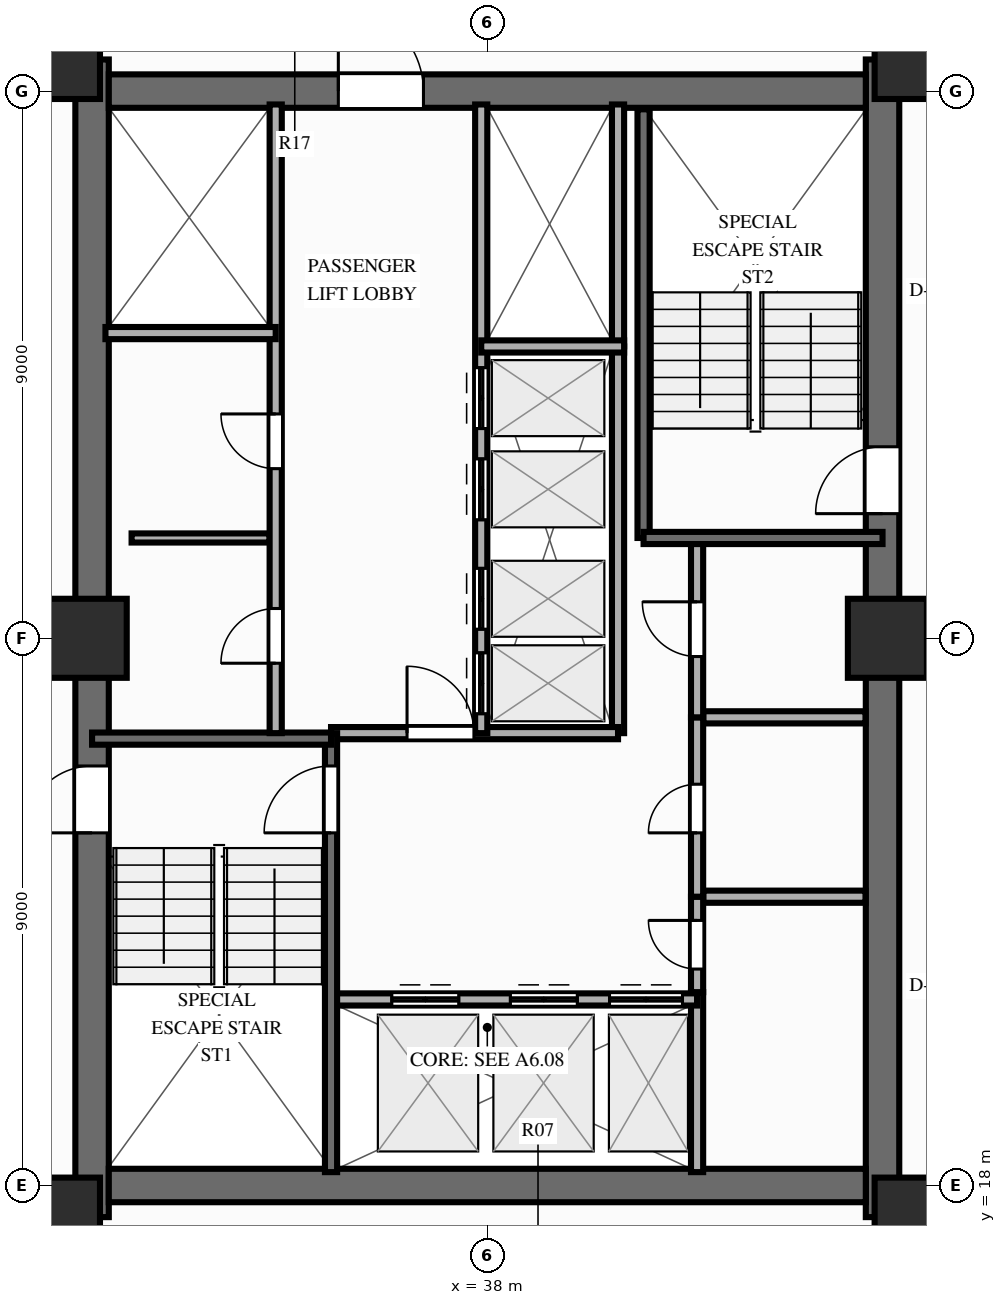
"""IFC4 building model, lengths in metres.
Left out: names, types, materials, properties, quantities, classifications, styles, units other than length and angle.
Written with IfcOpenShell. Run it as: python <this file> out.ifc"""

import sys

from ifc_helpers import new_model, si_unit, direction, frame, frame_2d, origin, origin_2d, place, context, subcontext, project, spatial, rectangle, extrude, source, transform, mapped, element, fill, save


model = new_model("IFC4")
c1 = context("Model", 3, precision=1e-05, world=origin(), true_north=direction((0.0, 1.0)))
c2 = subcontext(c1, "Body", "Model", "MODEL_VIEW")
j1 = project(units=[si_unit("LENGTHUNIT", "METRE"), si_unit("PLANEANGLEUNIT", "RADIAN")], contexts=[c1])
p1 = place(None, origin())
s1 = spatial("IfcSite", under=j1, at=p1, CompositionType="ELEMENT")
p2 = place(p1, origin())
s2 = spatial("IfcBuilding", under=s1, at=p2, CompositionType="ELEMENT")
p3 = place(p2, frame((0.0, 0.0, 98.85)))
s3 = spatial("IfcBuildingStorey", under=s2, at=p3, CompositionType="ELEMENT", Elevation=98.85)
p4 = place(p3, frame((31.5, 17.48, 0.0), z_axis=(0.0, 0.0, 1.0), x_axis=(0.0, 1.0, 0.0)))
e1 = element("IfcWall", 1, at=p4, inside=s3, PredefinedType="SHEAR", context=c2, shape_type="SweptSolid", body=[
    extrude(rectangle(XDim=19.04, YDim=0.55, at=frame_2d((9.52, 0.0))), origin(), (0.0, 0.0, 1.0), 3.0),
])
p5 = place(p4, frame((6.32, 0.0, 0.0)))
e2 = element("IfcOpeningElement", 2, at=p5, cuts=e1, PredefinedType="OPENING", context=c2, shape_type="SweptSolid", body=[
    extrude(rectangle(XDim=1.1, YDim=2.15, at=frame_2d((0.55, 1.075))), frame((0.0, 0.287, 0.0), z_axis=(0.0, -1.0, 0.0), x_axis=(1.0, 0.0, 0.0)), (0.0, 0.0, 1.0), 0.574),
])
p6 = place(p3, frame((44.5, 17.48, 0.0), z_axis=(0.0, 0.0, 1.0), x_axis=(0.0, 1.0, 0.0)))
e3 = element("IfcWall", 3, at=p6, inside=s3, PredefinedType="SHEAR", context=c2, shape_type="SweptSolid", body=[
    extrude(rectangle(XDim=19.04, YDim=0.55, at=frame_2d((9.52, 0.0))), origin(), (0.0, 0.0, 1.0), 3.0),
])
p7 = place(p6, frame((12.67, 0.0, 0.0), z_axis=(0.0, 0.0, 1.0), x_axis=(-1.0, 0.0, 0.0)))
e4 = element("IfcOpeningElement", 4, at=p7, cuts=e3, PredefinedType="OPENING", context=c2, shape_type="SweptSolid", body=[
    extrude(rectangle(XDim=1.1, YDim=2.15, at=frame_2d((0.55, 1.075))), frame((0.0, 0.287, 0.0), z_axis=(0.0, -1.0, 0.0), x_axis=(1.0, 0.0, 0.0)), (0.0, 0.0, 1.0), 0.574),
])
p8 = place(p3, frame((31.775, 18.0, 0.0), z_axis=(0.0, 0.0, 1.0), x_axis=(1.0, 0.0, 0.0)))
e5 = element("IfcWall", 5, at=p8, inside=s3, PredefinedType="SHEAR", context=c2, shape_type="SweptSolid", body=[
    extrude(rectangle(XDim=12.45, YDim=0.55, at=frame_2d((6.225, 0.0))), origin(), (0.0, 0.0, 1.0), 3.0),
])
p9 = place(p3, frame((31.775, 36.0, 0.0), z_axis=(0.0, 0.0, 1.0), x_axis=(1.0, 0.0, 0.0)))
e6 = element("IfcWall", 6, at=p9, inside=s3, PredefinedType="SHEAR", context=c2, shape_type="SweptSolid", body=[
    extrude(rectangle(XDim=12.45, YDim=0.55, at=frame_2d((6.225, 0.0))), origin(), (0.0, 0.0, 1.0), 3.0),
])
p10 = place(p9, frame((5.175, 0.0, 0.0), z_axis=(0.0, 0.0, 1.0), x_axis=(-1.0, 0.0, 0.0)))
e7 = element("IfcOpeningElement", 7, at=p10, cuts=e6, PredefinedType="OPENING", context=c2, shape_type="SweptSolid", body=[
    extrude(rectangle(XDim=1.4, YDim=2.15, at=frame_2d((0.7, 1.075))), frame((0.0, 0.287, 0.0), z_axis=(0.0, -1.0, 0.0), x_axis=(1.0, 0.0, 0.0)), (0.0, 0.0, 1.0), 0.574),
])
m1 = source(origin(), c2, "Body", "SweptSolid", [
    extrude(rectangle(XDim=1.3, YDim=1.3, at=origin_2d()), origin(), (0.0, 0.0, 1.0), 3.0),
])
for number, where, z_axis, x_axis in (
    (8, (30.98, 17.48, 0.0), (0.0, 0.0, 1.0), (1.0, 0.0, 0.0)),
    (9, (45.02, 17.48, 0.0), (0.0, 0.0, 1.0), (1.0, 0.0, 0.0)),
    (10, (30.98, 36.52, 0.0), (0.0, 0.0, 1.0), (1.0, 0.0, 0.0)),
    (11, (45.02, 36.52, 0.0), (0.0, 0.0, 1.0), (1.0, 0.0, 0.0)),
    (12, (31.42, 27.0, 0.0), (0.0, 0.0, 1.0), (1.0, 0.0, 0.0)),
    (13, (44.58, 27.0, 0.0), (0.0, 0.0, 1.0), (1.0, 0.0, 0.0)),
):
    element("IfcColumn", number, at=place(p3, frame(where, z_axis=z_axis, x_axis=x_axis)), inside=s3, PredefinedType="COLUMN", context=c2, shape_type="MappedRepresentation", body=[
        mapped(m1, transform((0.0, 0.0, 0.0), scale=1.0)),
    ])
p11 = place(p3, frame((32.15, 28.65, 0.0), z_axis=(0.0, 0.0, 1.0), x_axis=(1.0, 0.0, 0.0)))
e14 = element("IfcWall", 14, at=p11, inside=s3, PredefinedType="PARTITIONING", context=c2, shape_type="SweptSolid", body=[
    extrude(rectangle(XDim=2.27, YDim=0.15, at=frame_2d((1.135, 0.0))), origin(), (0.0, 0.0, 1.0), 2.14),
])
p12 = place(p3, frame((41.55, 22.75, 0.0), z_axis=(0.0, 0.0, 1.0), x_axis=(1.0, 0.0, 0.0)))
e15 = element("IfcWall", 15, at=p12, inside=s3, PredefinedType="PARTITIONING", context=c2, shape_type="SweptSolid", body=[
    extrude(rectangle(XDim=2.67, YDim=0.2, at=frame_2d((1.335, 0.0))), origin(), (0.0, 0.0, 1.0), 2.79),
])
p13 = place(p3, frame((41.55, 25.7, 0.0), z_axis=(0.0, 0.0, 1.0), x_axis=(1.0, 0.0, 0.0)))
e16 = element("IfcWall", 16, at=p13, inside=s3, PredefinedType="PARTITIONING", context=c2, shape_type="SweptSolid", body=[
    extrude(rectangle(XDim=2.67, YDim=0.2, at=frame_2d((1.335, 0.0))), origin(), (0.0, 0.0, 1.0), 2.14),
])
p14 = place(p3, frame((41.45, 18.22, 0.0), z_axis=(0.0, 0.0, 1.0), x_axis=(0.0, 1.0, 0.0)))
e17 = element("IfcWall", 17, at=p14, inside=s3, PredefinedType="PARTITIONING", context=c2, shape_type="SweptSolid", body=[
    extrude(rectangle(XDim=2.96, YDim=0.2, at=frame_2d((1.48, 0.0))), origin(), (0.0, 0.0, 1.0), 2.79),
])
p15 = place(p3, frame((41.45, 21.18, 0.0), z_axis=(0.0, 0.0, 1.0), x_axis=(0.0, 1.0, 0.0)))
e18 = element("IfcWall", 18, at=p15, inside=s3, PredefinedType="PARTITIONING", context=c2, shape_type="SweptSolid", body=[
    extrude(rectangle(XDim=1.57, YDim=0.2, at=frame_2d((0.785, 0.0))), origin(), (0.0, 0.0, 1.0), 2.79),
])
p16 = place(p15, frame((0.38, 0.0, 0.0)))
e19 = element("IfcOpeningElement", 19, at=p16, cuts=e18, PredefinedType="OPENING", context=c2, shape_type="SweptSolid", body=[
    extrude(rectangle(XDim=0.8, YDim=2.05, at=frame_2d((0.4, 1.025))), frame((0.0, 0.112, 0.0), z_axis=(0.0, -1.0, 0.0), x_axis=(1.0, 0.0, 0.0)), (0.0, 0.0, 1.0), 0.224),
])
p17 = place(p3, frame((41.45, 22.75, 0.0), z_axis=(0.0, 0.0, 1.0), x_axis=(0.0, 1.0, 0.0)))
e20 = element("IfcWall", 20, at=p17, inside=s3, PredefinedType="PARTITIONING", context=c2, shape_type="SweptSolid", body=[
    extrude(rectangle(XDim=2.95, YDim=0.2, at=frame_2d((1.475, 0.0))), origin(), (0.0, 0.0, 1.0), 2.79),
])
p18 = place(p17, frame((1.05, 0.0, 0.0)))
e21 = element("IfcOpeningElement", 21, at=p18, cuts=e20, PredefinedType="OPENING", context=c2, shape_type="SweptSolid", body=[
    extrude(rectangle(XDim=0.8, YDim=2.05, at=frame_2d((0.4, 1.025))), frame((0.0, 0.112, 0.0), z_axis=(0.0, -1.0, 0.0), x_axis=(1.0, 0.0, 0.0)), (0.0, 0.0, 1.0), 0.224),
])
p19 = place(p3, frame((41.45, 25.7, 0.0), z_axis=(0.0, 0.0, 1.0), x_axis=(0.0, 1.0, 0.0)))
e22 = element("IfcWall", 22, at=p19, inside=s3, PredefinedType="PARTITIONING", context=c2, shape_type="SweptSolid", body=[
    extrude(rectangle(XDim=2.9, YDim=0.2, at=frame_2d((1.45, 0.0))), origin(), (0.0, 0.0, 1.0), 2.79),
])
p20 = place(p19, frame((1.0, 0.0, 0.0)))
e23 = element("IfcOpeningElement", 23, at=p20, cuts=e22, PredefinedType="OPENING", context=c2, shape_type="SweptSolid", body=[
    extrude(rectangle(XDim=0.9, YDim=2.1, at=frame_2d((0.45, 1.05))), frame((0.0, 0.112, 0.0), z_axis=(0.0, -1.0, 0.0), x_axis=(1.0, 0.0, 0.0)), (0.0, 0.0, 1.0), 0.224),
])
p21 = place(p3, frame((40.15, 25.44, 0.0), z_axis=(0.0, 0.0, 1.0), x_axis=(0.0, 1.0, 0.0)))
e24 = element("IfcWall", 24, at=p21, inside=s3, PredefinedType="PARTITIONING", context=c2, shape_type="SweptSolid", body=[
    extrude(rectangle(XDim=6.36, YDim=0.2, at=frame_2d((3.18, 0.0))), origin(), (0.0, 0.0, 1.0), 2.79),
])
p22 = place(p3, frame((40.15, 31.8, 0.0), z_axis=(0.0, 0.0, 1.0), x_axis=(0.0, 1.0, 0.0)))
e25 = element("IfcWall", 25, at=p22, inside=s3, PredefinedType="PARTITIONING", context=c2, shape_type="SweptSolid", body=[
    extrude(rectangle(XDim=3.98, YDim=0.2, at=frame_2d((1.99, 0.0))), origin(), (0.0, 0.0, 1.0), 2.79),
])
p23 = place(p3, frame((35.43, 21.06, 0.0), z_axis=(0.0, 0.0, 1.0), x_axis=(1.0, 0.0, 0.0)))
e26 = element("IfcWall", 26, at=p23, inside=s3, PredefinedType="PARTITIONING", context=c2, shape_type="SweptSolid", body=[
    extrude(rectangle(XDim=6.02, YDim=0.2, at=frame_2d((3.01, 0.0))), origin(), (0.0, 0.0, 1.0), 2.79),
])
p24 = place(p23, frame((1.0, 0.0, 0.0)))
e27 = element("IfcOpeningElement", 27, at=p24, cuts=e26, PredefinedType="OPENING", context=c2, shape_type="SweptSolid", body=[
    extrude(rectangle(XDim=1.1, YDim=2.15, at=frame_2d((0.55, 1.075))), frame((0.0, 0.112, 0.0), z_axis=(0.0, -1.0, 0.0), x_axis=(1.0, 0.0, 0.0)), (0.0, 0.0, 1.0), 0.224),
])
p25 = place(p23, frame((2.95, 0.0, 0.0)))
e28 = element("IfcOpeningElement", 28, at=p25, cuts=e26, PredefinedType="OPENING", context=c2, shape_type="SweptSolid", body=[
    extrude(rectangle(XDim=1.1, YDim=2.15, at=frame_2d((0.55, 1.075))), frame((0.0, 0.112, 0.0), z_axis=(0.0, -1.0, 0.0), x_axis=(1.0, 0.0, 0.0)), (0.0, 0.0, 1.0), 0.224),
])
p26 = place(p23, frame((4.58, 0.0, 0.0)))
e29 = element("IfcOpeningElement", 29, at=p26, cuts=e26, PredefinedType="OPENING", context=c2, shape_type="SweptSolid", body=[
    extrude(rectangle(XDim=1.2, YDim=2.15, at=frame_2d((0.6, 1.075))), frame((0.0, 0.112, 0.0), z_axis=(0.0, -1.0, 0.0), x_axis=(1.0, 0.0, 0.0)), (0.0, 0.0, 1.0), 0.224),
])
p27 = place(p3, frame((35.43, 25.44, 0.0), z_axis=(0.0, 0.0, 1.0), x_axis=(1.0, 0.0, 0.0)))
e30 = element("IfcWall", 30, at=p27, inside=s3, PredefinedType="PARTITIONING", context=c2, shape_type="SweptSolid", body=[
    extrude(rectangle(XDim=4.72, YDim=0.2, at=frame_2d((2.36, 0.0))), origin(), (0.0, 0.0, 1.0), 2.79),
])
p28 = place(p27, frame((1.25, 0.0, 0.0)))
e31 = element("IfcOpeningElement", 31, at=p28, cuts=e30, PredefinedType="OPENING", context=c2, shape_type="SweptSolid", body=[
    extrude(rectangle(XDim=1.1, YDim=2.15, at=frame_2d((0.55, 1.075))), frame((0.0, 0.112, 0.0), z_axis=(0.0, -1.0, 0.0), x_axis=(1.0, 0.0, 0.0)), (0.0, 0.0, 1.0), 0.224),
])
p29 = place(p3, frame((35.43, 18.22, 0.0), z_axis=(0.0, 0.0, 1.0), x_axis=(0.0, 1.0, 0.0)))
e32 = element("IfcWall", 32, at=p29, inside=s3, PredefinedType="SOLIDWALL", context=c2, shape_type="SweptSolid", body=[
    extrude(rectangle(XDim=7.22, YDim=0.2, at=frame_2d((3.61, 0.0))), origin(), (0.0, 0.0, 1.0), 2.79),
])
p30 = place(p29, frame((6.68, 0.0, 0.0), z_axis=(0.0, 0.0, 1.0), x_axis=(-1.0, 0.0, 0.0)))
e33 = element("IfcOpeningElement", 33, at=p30, cuts=e32, PredefinedType="OPENING", context=c2, shape_type="SweptSolid", body=[
    extrude(rectangle(XDim=1.1, YDim=2.15, at=frame_2d((0.55, 1.075))), frame((0.0, 0.112, 0.0), z_axis=(0.0, -1.0, 0.0), x_axis=(1.0, 0.0, 0.0)), (0.0, 0.0, 1.0), 0.224),
])
p31 = place(p3, frame((31.5, 25.35, 0.0), z_axis=(0.0, 0.0, 1.0), x_axis=(1.0, 0.0, 0.0)))
e34 = element("IfcWall", 34, at=p31, inside=s3, PredefinedType="SOLIDWALL", context=c2, shape_type="SweptSolid", body=[
    extrude(rectangle(XDim=3.93, YDim=0.2, at=frame_2d((1.965, 0.0))), origin(), (0.0, 0.0, 1.0), 2.79),
])
p32 = place(p3, frame((40.57, 28.65, 0.0), z_axis=(0.0, 0.0, 1.0), x_axis=(0.0, 1.0, 0.0)))
e35 = element("IfcWall", 35, at=p32, inside=s3, PredefinedType="SOLIDWALL", context=c2, shape_type="SweptSolid", body=[
    extrude(rectangle(XDim=7.05, YDim=0.2, at=frame_2d((3.525, 0.0))), origin(), (0.0, 0.0, 1.0), 2.79),
])
p33 = place(p3, frame((40.57, 28.65, 0.0), z_axis=(0.0, 0.0, 1.0), x_axis=(1.0, 0.0, 0.0)))
e36 = element("IfcWall", 36, at=p33, inside=s3, PredefinedType="SOLIDWALL", context=c2, shape_type="SweptSolid", body=[
    extrude(rectangle(XDim=3.93, YDim=0.2, at=frame_2d((1.965, 0.0))), origin(), (0.0, 0.0, 1.0), 2.79),
])
p34 = place(p3, frame((34.52, 25.44, 0.0), z_axis=(0.0, 0.0, 1.0), x_axis=(0.0, 1.0, 0.0)))
e37 = element("IfcWall", 37, at=p34, inside=s3, PredefinedType="PARTITIONING", context=c2, shape_type="SweptSolid", body=[
    extrude(rectangle(XDim=10.34, YDim=0.2, at=frame_2d((5.17, 0.0))), origin(), (0.0, 0.0, 1.0), 2.79),
])
p35 = place(p34, frame((1.15, 0.0, 0.0)))
e38 = element("IfcOpeningElement", 38, at=p35, cuts=e37, PredefinedType="OPENING", context=c2, shape_type="SweptSolid", body=[
    extrude(rectangle(XDim=0.9, YDim=2.1, at=frame_2d((0.45, 1.05))), frame((0.0, 0.112, 0.0), z_axis=(0.0, -1.0, 0.0), x_axis=(1.0, 0.0, 0.0)), (0.0, 0.0, 1.0), 0.224),
])
p36 = place(p34, frame((4.35, 0.0, 0.0)))
e39 = element("IfcOpeningElement", 39, at=p36, cuts=e37, PredefinedType="OPENING", context=c2, shape_type="SweptSolid", body=[
    extrude(rectangle(XDim=0.9, YDim=2.1, at=frame_2d((0.45, 1.05))), frame((0.0, 0.112, 0.0), z_axis=(0.0, -1.0, 0.0), x_axis=(1.0, 0.0, 0.0)), (0.0, 0.0, 1.0), 0.224),
])
p37 = place(p3, frame((31.72, 32.02, 0.0), z_axis=(0.0, 0.0, 1.0), x_axis=(1.0, 0.0, 0.0)))
e40 = element("IfcWall", 40, at=p37, inside=s3, PredefinedType="PARTITIONING", context=c2, shape_type="SweptSolid", body=[
    extrude(rectangle(XDim=2.8, YDim=0.2, at=frame_2d((1.4, 0.0))), origin(), (0.0, 0.0, 1.0), 2.79),
])
p38 = place(p3, frame((37.9, 25.44, 0.0), z_axis=(0.0, 0.0, 1.0), x_axis=(0.0, 1.0, 0.0)))
e41 = element("IfcWall", 41, at=p38, inside=s3, PredefinedType="PARTITIONING", context=c2, shape_type="SweptSolid", body=[
    extrude(rectangle(XDim=10.34, YDim=0.2, at=frame_2d((5.17, 0.0))), origin(), (0.0, 0.0, 1.0), 2.79),
])
p39 = place(p38, frame((0.32, 0.0, 0.0)))
e42 = element("IfcOpeningElement", 42, at=p39, cuts=e41, PredefinedType="OPENING", context=c2, shape_type="SweptSolid", body=[
    extrude(rectangle(XDim=1.0, YDim=2.15, at=frame_2d((0.5, 1.075))), frame((0.0, 0.112, 0.0), z_axis=(0.0, -1.0, 0.0), x_axis=(1.0, 0.0, 0.0)), (0.0, 0.0, 1.0), 0.224),
])
p40 = place(p38, frame((1.71, 0.0, 0.0)))
e43 = element("IfcOpeningElement", 43, at=p40, cuts=e41, PredefinedType="OPENING", context=c2, shape_type="SweptSolid", body=[
    extrude(rectangle(XDim=1.0, YDim=2.15, at=frame_2d((0.5, 1.075))), frame((0.0, 0.112, 0.0), z_axis=(0.0, -1.0, 0.0), x_axis=(1.0, 0.0, 0.0)), (0.0, 0.0, 1.0), 0.224),
])
p41 = place(p38, frame((3.51, 0.0, 0.0)))
e44 = element("IfcOpeningElement", 44, at=p41, cuts=e41, PredefinedType="OPENING", context=c2, shape_type="SweptSolid", body=[
    extrude(rectangle(XDim=1.0, YDim=2.15, at=frame_2d((0.5, 1.075))), frame((0.0, 0.112, 0.0), z_axis=(0.0, -1.0, 0.0), x_axis=(1.0, 0.0, 0.0)), (0.0, 0.0, 1.0), 0.224),
])
p42 = place(p38, frame((5.01, 0.0, 0.0)))
e45 = element("IfcOpeningElement", 45, at=p42, cuts=e41, PredefinedType="OPENING", context=c2, shape_type="SweptSolid", body=[
    extrude(rectangle(XDim=1.0, YDim=2.15, at=frame_2d((0.5, 1.075))), frame((0.0, 0.112, 0.0), z_axis=(0.0, -1.0, 0.0), x_axis=(1.0, 0.0, 0.0)), (0.0, 0.0, 1.0), 0.224),
])
p43 = place(p3, frame((37.9, 31.8, 0.0), z_axis=(0.0, 0.0, 1.0), x_axis=(1.0, 0.0, 0.0)))
e46 = element("IfcWall", 46, at=p43, inside=s3, PredefinedType="PARTITIONING", context=c2, shape_type="SweptSolid", body=[
    extrude(rectangle(XDim=2.35, YDim=0.2, at=frame_2d((1.175, 0.0))), origin(), (0.0, 0.0, 1.0), 2.79),
])
m2 = source(origin(), c2, "Body", "SweptSolid", [
    extrude(rectangle(XDim=1.1, YDim=2.15, at=frame_2d((0.55, 1.075))), frame((0.0, 0.025, 0.0), z_axis=(0.0, -1.0, 0.0), x_axis=(1.0, 0.0, 0.0)), (0.0, 0.0, 1.0), 0.05),
])
p44 = place(p5, origin())
e47 = element("IfcDoor", 47, at=p44, inside=s3, OperationType="SINGLE_SWING_LEFT", PredefinedType="DOOR", context=c2, shape_type="MappedRepresentation", body=[
    mapped(m2, transform((0.0, 0.0, 0.0), scale=1.0)),
])
fill(e2, e47)
p45 = place(p7, origin())
e48 = element("IfcDoor", 48, at=p45, inside=s3, OperationType="SINGLE_SWING_RIGHT", PredefinedType="DOOR", context=c2, shape_type="MappedRepresentation", body=[
    mapped(m2, transform((0.0, 0.0, 0.0), scale=1.0)),
])
fill(e4, e48)
m3 = source(origin(), c2, "Body", "SweptSolid", [
    extrude(rectangle(XDim=1.4, YDim=2.15, at=frame_2d((0.7, 1.075))), frame((0.0, 0.025, 0.0), z_axis=(0.0, -1.0, 0.0), x_axis=(1.0, 0.0, 0.0)), (0.0, 0.0, 1.0), 0.05),
])
p46 = place(p10, origin())
e49 = element("IfcDoor", 49, at=p46, inside=s3, OperationType="SINGLE_SWING_RIGHT", PredefinedType="DOOR", context=c2, shape_type="MappedRepresentation", body=[
    mapped(m3, transform((0.0, 0.0, 0.0), scale=1.0)),
])
fill(e7, e49)
m4 = source(origin(), c2, "Body", "SweptSolid", [
    extrude(rectangle(XDim=0.8, YDim=2.05, at=frame_2d((0.4, 1.025))), frame((0.0, 0.025, 0.0), z_axis=(0.0, -1.0, 0.0), x_axis=(1.0, 0.0, 0.0)), (0.0, 0.0, 1.0), 0.05),
])
p47 = place(p16, origin())
e50 = element("IfcDoor", 50, at=p47, inside=s3, OperationType="SINGLE_SWING_RIGHT", PredefinedType="DOOR", context=c2, shape_type="MappedRepresentation", body=[
    mapped(m4, transform((0.0, 0.0, 0.0), scale=1.0)),
])
fill(e19, e50)
p48 = place(p18, origin())
e51 = element("IfcDoor", 51, at=p48, inside=s3, OperationType="SINGLE_SWING_LEFT", PredefinedType="DOOR", context=c2, shape_type="MappedRepresentation", body=[
    mapped(m4, transform((0.0, 0.0, 0.0), scale=1.0)),
])
fill(e21, e51)
m5 = source(origin(), c2, "Body", "SweptSolid", [
    extrude(rectangle(XDim=0.9, YDim=2.1, at=frame_2d((0.45, 1.05))), frame((0.0, 0.025, 0.0), z_axis=(0.0, -1.0, 0.0), x_axis=(1.0, 0.0, 0.0)), (0.0, 0.0, 1.0), 0.05),
])
p49 = place(p20, origin())
e52 = element("IfcDoor", 52, at=p49, inside=s3, OperationType="SINGLE_SWING_RIGHT", PredefinedType="DOOR", context=c2, shape_type="MappedRepresentation", body=[
    mapped(m5, transform((0.0, 0.0, 0.0), scale=1.0)),
])
fill(e23, e52)
p50 = place(p24, origin())
e53 = element("IfcDoor", 53, at=p50, inside=s3, OperationType="DOUBLE_DOOR_SLIDING", PredefinedType="DOOR", context=c2, shape_type="MappedRepresentation", body=[
    mapped(m2, transform((0.0, 0.0, 0.0), scale=1.0)),
])
fill(e27, e53)
p51 = place(p25, origin())
e54 = element("IfcDoor", 54, at=p51, inside=s3, OperationType="DOUBLE_DOOR_SLIDING", PredefinedType="DOOR", context=c2, shape_type="MappedRepresentation", body=[
    mapped(m2, transform((0.0, 0.0, 0.0), scale=1.0)),
])
fill(e28, e54)
m6 = source(origin(), c2, "Body", "SweptSolid", [
    extrude(rectangle(XDim=1.2, YDim=2.15, at=frame_2d((0.6, 1.075))), frame((0.0, 0.025, 0.0), z_axis=(0.0, -1.0, 0.0), x_axis=(1.0, 0.0, 0.0)), (0.0, 0.0, 1.0), 0.05),
])
p52 = place(p26, origin())
e55 = element("IfcDoor", 55, at=p52, inside=s3, OperationType="DOUBLE_DOOR_SLIDING", PredefinedType="DOOR", context=c2, shape_type="MappedRepresentation", body=[
    mapped(m6, transform((0.0, 0.0, 0.0), scale=1.0)),
])
fill(e29, e55)
p53 = place(p28, origin())
e56 = element("IfcDoor", 56, at=p53, inside=s3, OperationType="SINGLE_SWING_LEFT", PredefinedType="DOOR", context=c2, shape_type="MappedRepresentation", body=[
    mapped(m2, transform((0.0, 0.0, 0.0), scale=1.0)),
])
fill(e31, e56)
p54 = place(p30, origin())
e57 = element("IfcDoor", 57, at=p54, inside=s3, OperationType="SINGLE_SWING_RIGHT", PredefinedType="DOOR", context=c2, shape_type="MappedRepresentation", body=[
    mapped(m2, transform((0.0, 0.0, 0.0), scale=1.0)),
])
fill(e33, e57)
p55 = place(p35, origin())
e58 = element("IfcDoor", 58, at=p55, inside=s3, OperationType="SINGLE_SWING_LEFT", PredefinedType="DOOR", context=c2, shape_type="MappedRepresentation", body=[
    mapped(m5, transform((0.0, 0.0, 0.0), scale=1.0)),
])
fill(e38, e58)
p56 = place(p36, origin())
e59 = element("IfcDoor", 59, at=p56, inside=s3, OperationType="SINGLE_SWING_RIGHT", PredefinedType="DOOR", context=c2, shape_type="MappedRepresentation", body=[
    mapped(m5, transform((0.0, 0.0, 0.0), scale=1.0)),
])
fill(e39, e59)
m7 = source(origin(), c2, "Body", "SweptSolid", [
    extrude(rectangle(XDim=1.0, YDim=2.15, at=frame_2d((0.5, 1.075))), frame((0.0, 0.025, 0.0), z_axis=(0.0, -1.0, 0.0), x_axis=(1.0, 0.0, 0.0)), (0.0, 0.0, 1.0), 0.05),
])
p57 = place(p39, origin())
e60 = element("IfcDoor", 60, at=p57, inside=s3, OperationType="DOUBLE_DOOR_SLIDING", PredefinedType="DOOR", context=c2, shape_type="MappedRepresentation", body=[
    mapped(m7, transform((0.0, 0.0, 0.0), scale=1.0)),
])
fill(e42, e60)
p58 = place(p40, origin())
e61 = element("IfcDoor", 61, at=p58, inside=s3, OperationType="DOUBLE_DOOR_SLIDING", PredefinedType="DOOR", context=c2, shape_type="MappedRepresentation", body=[
    mapped(m7, transform((0.0, 0.0, 0.0), scale=1.0)),
])
fill(e43, e61)
p59 = place(p41, origin())
e62 = element("IfcDoor", 62, at=p59, inside=s3, OperationType="DOUBLE_DOOR_SLIDING", PredefinedType="DOOR", context=c2, shape_type="MappedRepresentation", body=[
    mapped(m7, transform((0.0, 0.0, 0.0), scale=1.0)),
])
fill(e44, e62)
p60 = place(p42, origin())
e63 = element("IfcDoor", 63, at=p60, inside=s3, OperationType="DOUBLE_DOOR_SLIDING", PredefinedType="DOOR", context=c2, shape_type="MappedRepresentation", body=[
    mapped(m7, transform((0.0, 0.0, 0.0), scale=1.0)),
])
fill(e45, e63)
save(model, sys.argv[1])
